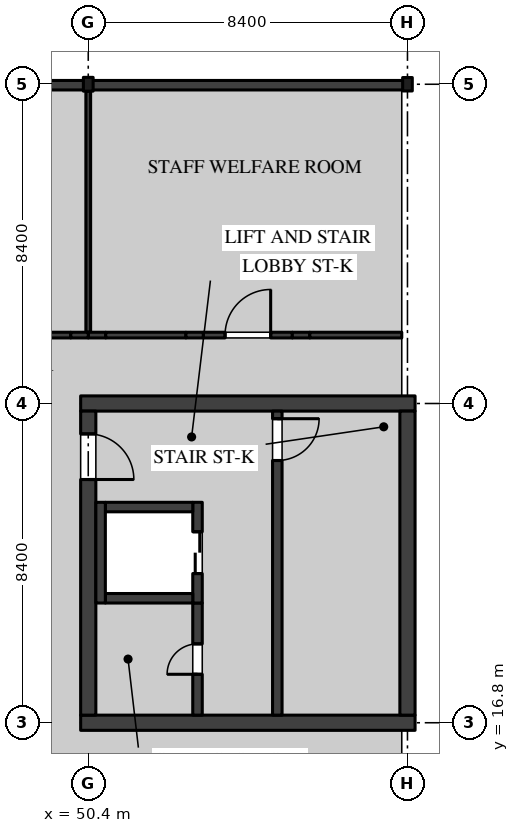
"""IFC4 building model, lengths in metres.
Left out: names, types, materials, properties, quantities, classifications, styles, units other than length and angle.
Written with IfcOpenShell. Run it as: python <this file> out.ifc"""

import sys

from ifc_helpers import new_model, si_unit, direction, frame, frame_2d, origin, origin_2d, place, context, subcontext, project, spatial, rectangle, i_section, extrude, element, fill, save


model = new_model("IFC4")
c1 = context("Model", 3, precision=1e-05, world=origin(), true_north=direction((0.0, 1.0)))
c2 = subcontext(c1, "Body", "Model", "MODEL_VIEW")
j1 = project(units=[si_unit("LENGTHUNIT", "METRE"), si_unit("PLANEANGLEUNIT", "RADIAN")], contexts=[c1])
p1 = place(None, origin())
s1 = spatial("IfcSite", under=j1, at=p1, CompositionType="ELEMENT")
p2 = place(p1, origin())
s2 = spatial("IfcBuilding", under=s1, at=p2, CompositionType="ELEMENT")
p3 = place(p2, frame((0.0, 0.0, 14.4)))
s3 = spatial("IfcBuildingStorey", under=s2, at=p3, CompositionType="ELEMENT", Elevation=14.4)
p4 = place(p3, frame((50.4, 33.6, 0.0), z_axis=(0.0, 0.0, 1.0), x_axis=(1.0, 0.0, 0.0)))
e1 = element("IfcColumn", 1, at=p4, inside=s3, PredefinedType="COLUMN", context=c2, shape_type="SweptSolid", body=[
    extrude(i_section(OverallWidth=0.257, OverallDepth=0.363, WebThickness=0.013, FlangeThickness=0.022, FilletRadius=0.015, at=origin_2d()), origin(), (0.0, 0.0, 1.0), 4.37),
])
p5 = place(p3, frame((58.8, 33.6, 0.0), z_axis=(0.0, 0.0, 1.0), x_axis=(1.0, 0.0, 0.0)))
e2 = element("IfcColumn", 2, at=p5, inside=s3, PredefinedType="COLUMN", context=c2, shape_type="SweptSolid", body=[
    extrude(i_section(OverallWidth=0.254, OverallDepth=0.353, WebThickness=0.01, FlangeThickness=0.016, FilletRadius=0.015, at=origin_2d()), origin(), (0.0, 0.0, 1.0), 4.37),
])
for number, where, z_axis, x_axis in (
    (3, (50.2, 16.8, 0.0), (0.0, 0.0, 1.0), (1.0, 0.0, 0.0)),
    (4, (50.2, 25.2, 0.0), (0.0, 0.0, 1.0), (1.0, 0.0, 0.0)),
):
    element("IfcWall", number, at=place(p3, frame(where, z_axis=z_axis, x_axis=x_axis)), inside=s3, PredefinedType="SHEAR", context=c2, shape_type="SweptSolid", body=[
        extrude(rectangle(XDim=8.8, YDim=0.4, at=frame_2d((4.4, 0.0))), origin(), (0.0, 0.0, 1.0), 4.37),
    ])
p6 = place(p3, frame((50.4, 17.0, 0.0), z_axis=(0.0, 0.0, 1.0), x_axis=(0.0, 1.0, 0.0)))
e5 = element("IfcWall", 5, at=p6, inside=s3, PredefinedType="SHEAR", context=c2, shape_type="SweptSolid", body=[
    extrude(rectangle(XDim=8.0, YDim=0.4, at=frame_2d((4.0, 0.0))), origin(), (0.0, 0.0, 1.0), 4.37),
])
p7 = place(p6, frame((6.2, 0.0, 0.0)))
e6 = element("IfcOpeningElement", 6, at=p7, cuts=e5, PredefinedType="OPENING", context=c2, shape_type="SweptSolid", body=[
    extrude(rectangle(XDim=1.2, YDim=2.1, at=frame_2d((0.6, 1.05))), frame((0.0, 0.21, 0.0), z_axis=(0.0, -1.0, 0.0), x_axis=(1.0, 0.0, 0.0)), (0.0, 0.0, 1.0), 0.42),
])
p8 = place(p3, frame((58.8, 17.0, 0.0), z_axis=(0.0, 0.0, 1.0), x_axis=(0.0, 1.0, 0.0)))
e7 = element("IfcWall", 7, at=p8, inside=s3, PredefinedType="SHEAR", context=c2, shape_type="SweptSolid", body=[
    extrude(rectangle(XDim=8.0, YDim=0.4, at=frame_2d((4.0, 0.0))), origin(), (0.0, 0.0, 1.0), 4.37),
])
p9 = place(p3, frame((55.375, 25.0, 0.0), z_axis=(0.0, 0.0, 1.0), x_axis=(0.0, -1.0, 0.0)))
e8 = element("IfcWall", 8, at=p9, inside=s3, PredefinedType="SOLIDWALL", context=c2, shape_type="SweptSolid", body=[
    extrude(rectangle(XDim=8.0, YDim=0.25, at=frame_2d((4.0, 0.0))), origin(), (0.0, 0.0, 1.0), 4.37),
])
p10 = place(p9, frame((0.2, 0.0, 0.0)))
e9 = element("IfcOpeningElement", 9, at=p10, cuts=e8, PredefinedType="OPENING", context=c2, shape_type="SweptSolid", body=[
    extrude(rectangle(XDim=1.1, YDim=2.1, at=frame_2d((0.55, 1.05))), frame((0.0, 0.135, 0.0), z_axis=(0.0, -1.0, 0.0), x_axis=(1.0, 0.0, 0.0)), (0.0, 0.0, 1.0), 0.27),
])
p11 = place(p3, frame((53.275, 19.95, 0.0), z_axis=(0.0, 0.0, 1.0), x_axis=(0.0, -1.0, 0.0)))
e10 = element("IfcWall", 10, at=p11, inside=s3, PredefinedType="SOLIDWALL", context=c2, shape_type="SweptSolid", body=[
    extrude(rectangle(XDim=2.95, YDim=0.25, at=frame_2d((1.475, 0.0))), origin(), (0.0, 0.0, 1.0), 4.37),
])
p12 = place(p11, frame((1.075, 0.0, 0.0)))
e11 = element("IfcOpeningElement", 11, at=p12, cuts=e10, PredefinedType="OPENING", context=c2, shape_type="SweptSolid", body=[
    extrude(rectangle(XDim=0.8, YDim=2.1, at=frame_2d((0.4, 1.05))), frame((0.0, 0.135, 0.0), z_axis=(0.0, -1.0, 0.0), x_axis=(1.0, 0.0, 0.0)), (0.0, 0.0, 1.0), 0.27),
])
p13 = place(p3, frame((53.275, 19.95, 0.0), z_axis=(0.0, 0.0, 1.0), x_axis=(0.0, 1.0, 0.0)))
e12 = element("IfcWall", 12, at=p13, inside=s3, PredefinedType="SOLIDWALL", context=c2, shape_type="SweptSolid", body=[
    extrude(rectangle(XDim=2.65, YDim=0.25, at=frame_2d((1.325, 0.0))), origin(), (0.0, 0.0, 1.0), 4.37),
])
p14 = place(p13, frame((0.775, 0.0, 0.0)))
e13 = element("IfcOpeningElement", 13, at=p14, cuts=e12, PredefinedType="OPENING", context=c2, shape_type="SweptSolid", body=[
    extrude(rectangle(XDim=1.1, YDim=2.1, at=frame_2d((0.55, 1.05))), frame((0.0, 0.135, 0.0), z_axis=(0.0, -1.0, 0.0), x_axis=(1.0, 0.0, 0.0)), (0.0, 0.0, 1.0), 0.27),
])
for number, where, z_axis, x_axis in (
    (14, (50.85, 22.475, 0.0), (0.0, 0.0, 1.0), (1.0, 0.0, 0.0)),
    (15, (50.85, 20.075, 0.0), (0.0, 0.0, 1.0), (1.0, 0.0, 0.0)),
):
    element("IfcWall", number, at=place(p3, frame(where, z_axis=z_axis, x_axis=x_axis)), inside=s3, PredefinedType="SOLIDWALL", context=c2, shape_type="SweptSolid", body=[
        extrude(rectangle(XDim=2.3, YDim=0.25, at=frame_2d((1.15, 0.0))), origin(), (0.0, 0.0, 1.0), 4.37),
    ])
p15 = place(p3, frame((50.725, 19.95, 0.0), z_axis=(0.0, 0.0, 1.0), x_axis=(0.0, 1.0, 0.0)))
e16 = element("IfcWall", 16, at=p15, inside=s3, PredefinedType="SOLIDWALL", context=c2, shape_type="SweptSolid", body=[
    extrude(rectangle(XDim=2.65, YDim=0.25, at=frame_2d((1.325, 0.0))), origin(), (0.0, 0.0, 1.0), 4.37),
])
p16 = place(p3, frame((50.4, 27.075, 0.0), z_axis=(0.0, 0.0, 1.0), x_axis=(0.0, 1.0, 0.0)))
e17 = element("IfcWall", 17, at=p16, inside=s3, PredefinedType="PARTITIONING", context=c2, shape_type="SweptSolid", body=[
    extrude(rectangle(XDim=6.344, YDim=0.125, at=frame_2d((3.172, 0.0))), origin(), (0.0, 0.0, 1.0), 3.743),
])
p17 = place(p3, frame((50.4, 27.0, 0.0), z_axis=(0.0, 0.0, 1.0), x_axis=(1.0, 0.0, 0.0)))
e18 = element("IfcWall", 18, at=p17, inside=s3, PredefinedType="PARTITIONING", context=c2, shape_type="SweptSolid", body=[
    extrude(rectangle(XDim=0.46, YDim=0.15, at=frame_2d((0.23, 0.0))), origin(), (0.0, 0.0, 1.0), 3.743),
])
p18 = place(p3, frame((50.86, 27.0, 0.0), z_axis=(0.0, 0.0, 1.0), x_axis=(1.0, 0.0, 0.0)))
e19 = element("IfcWall", 19, at=p18, inside=s3, PredefinedType="PARTITIONING", context=c2, shape_type="SweptSolid", body=[
    extrude(rectangle(XDim=2.11, YDim=0.15, at=frame_2d((1.055, 0.0))), origin(), (0.0, 0.0, 1.0), 4.37),
])
p19 = place(p3, frame((52.97, 27.0, 0.0), z_axis=(0.0, 0.0, 1.0), x_axis=(1.0, 0.0, 0.0)))
e20 = element("IfcWall", 20, at=p19, inside=s3, PredefinedType="PARTITIONING", context=c2, shape_type="SweptSolid", body=[
    extrude(rectangle(XDim=0.46, YDim=0.15, at=frame_2d((0.23, 0.0))), origin(), (0.0, 0.0, 1.0), 3.941),
])
p20 = place(p3, frame((53.43, 27.0, 0.0), z_axis=(0.0, 0.0, 1.0), x_axis=(1.0, 0.0, 0.0)))
e21 = element("IfcWall", 21, at=p20, inside=s3, PredefinedType="PARTITIONING", context=c2, shape_type="SweptSolid", body=[
    extrude(rectangle(XDim=2.34, YDim=0.15, at=frame_2d((1.17, 0.0))), origin(), (0.0, 0.0, 1.0), 4.37),
])
p21 = place(p20, frame((0.57, 0.0, 0.0)))
e22 = element("IfcOpeningElement", 22, at=p21, cuts=e21, PredefinedType="OPENING", context=c2, shape_type="SweptSolid", body=[
    extrude(rectangle(XDim=1.2, YDim=2.4, at=frame_2d((0.6, 1.2))), frame((0.0, 0.085, 0.0), z_axis=(0.0, -1.0, 0.0), x_axis=(1.0, 0.0, 0.0)), (0.0, 0.0, 1.0), 0.17),
])
p22 = place(p3, frame((55.77, 27.0, 0.0), z_axis=(0.0, 0.0, 1.0), x_axis=(1.0, 0.0, 0.0)))
e23 = element("IfcWall", 23, at=p22, inside=s3, PredefinedType="PARTITIONING", context=c2, shape_type="SweptSolid", body=[
    extrude(rectangle(XDim=0.46, YDim=0.15, at=frame_2d((0.23, 0.0))), origin(), (0.0, 0.0, 1.0), 3.941),
])
p23 = place(p3, frame((56.23, 27.0, 0.0), z_axis=(0.0, 0.0, 1.0), x_axis=(1.0, 0.0, 0.0)))
e24 = element("IfcWall", 24, at=p23, inside=s3, PredefinedType="PARTITIONING", context=c2, shape_type="SweptSolid", body=[
    extrude(rectangle(XDim=2.42, YDim=0.15, at=frame_2d((1.21, 0.0))), origin(), (0.0, 0.0, 1.0), 4.37),
])
p24 = place(p3, frame((47.83, 27.0, 0.0), z_axis=(0.0, 0.0, 1.0), x_axis=(1.0, 0.0, 0.0)))
e25 = element("IfcWall", 25, at=p24, inside=s3, PredefinedType="PARTITIONING", context=c2, shape_type="SweptSolid", body=[
    extrude(rectangle(XDim=2.11, YDim=0.15, at=frame_2d((1.055, 0.0))), origin(), (0.0, 0.0, 1.0), 4.37),
])
p25 = place(p3, frame((49.94, 27.0, 0.0), z_axis=(0.0, 0.0, 1.0), x_axis=(1.0, 0.0, 0.0)))
e26 = element("IfcWall", 26, at=p25, inside=s3, PredefinedType="PARTITIONING", context=c2, shape_type="SweptSolid", body=[
    extrude(rectangle(XDim=0.46, YDim=0.15, at=frame_2d((0.23, 0.0))), origin(), (0.0, 0.0, 1.0), 3.743),
])
p26 = place(p3, frame((58.795, 33.575, 0.0), z_axis=(0.0, 0.0, 1.0), x_axis=(-1.0, 0.0, 0.0)))
e27 = element("IfcWall", 27, at=p26, inside=s3, PredefinedType="SOLIDWALL", context=c2, shape_type="SweptSolid", body=[
    extrude(rectangle(XDim=8.391, YDim=0.25, at=frame_2d((4.195, 0.0))), origin(), (0.0, 0.0, 1.0), 3.819),
])
p27 = place(p3, frame((50.396, 33.575, 0.0), z_axis=(0.0, 0.0, 1.0), x_axis=(-1.0, 0.0, 0.0)))
e28 = element("IfcWall", 28, at=p27, inside=s3, PredefinedType="SOLIDWALL", context=c2, shape_type="SweptSolid", body=[
    extrude(rectangle(XDim=8.393, YDim=0.25, at=frame_2d((4.196, 0.0))), origin(), (0.0, 0.0, 1.0), 3.743),
])
p28 = place(p7, frame((1.2, 0.0, 0.0), z_axis=(0.0, 0.0, 1.0), x_axis=(-1.0, 0.0, 0.0)))
e29 = element("IfcDoor", 29, at=p28, inside=s3, OperationType="SINGLE_SWING_LEFT", PredefinedType="DOOR", context=c2, shape_type="SweptSolid", body=[
    extrude(rectangle(XDim=1.2, YDim=2.1, at=frame_2d((0.6, 1.05))), frame((0.0, 0.035, 0.0), z_axis=(0.0, -1.0, 0.0), x_axis=(1.0, 0.0, 0.0)), (0.0, 0.0, 1.0), 0.07),
])
fill(e6, e29)
p29 = place(p12, frame((0.8, 0.0, 0.0), z_axis=(0.0, 0.0, 1.0), x_axis=(-1.0, 0.0, 0.0)))
e30 = element("IfcDoor", 30, at=p29, inside=s3, OperationType="SINGLE_SWING_RIGHT", PredefinedType="DOOR", context=c2, shape_type="SweptSolid", body=[
    extrude(rectangle(XDim=0.8, YDim=2.1, at=frame_2d((0.4, 1.05))), frame((0.0, 0.035, 0.0), z_axis=(0.0, -1.0, 0.0), x_axis=(1.0, 0.0, 0.0)), (0.0, 0.0, 1.0), 0.07),
])
fill(e11, e30)
p30 = place(p10, origin())
e31 = element("IfcDoor", 31, at=p30, inside=s3, OperationType="SINGLE_SWING_RIGHT", PredefinedType="DOOR", context=c2, shape_type="SweptSolid", body=[
    extrude(rectangle(XDim=1.1, YDim=2.1, at=frame_2d((0.55, 1.05))), frame((0.0, 0.035, 0.0), z_axis=(0.0, -1.0, 0.0), x_axis=(1.0, 0.0, 0.0)), (0.0, 0.0, 1.0), 0.07),
])
fill(e9, e31)
p31 = place(p14, origin())
e32 = element("IfcDoor", 32, at=p31, inside=s3, OperationType="DOUBLE_DOOR_SLIDING", PredefinedType="DOOR", context=c2, shape_type="SweptSolid", body=[
    extrude(rectangle(XDim=1.1, YDim=2.1, at=frame_2d((0.55, 1.05))), frame((0.0, 0.04, 0.0), z_axis=(0.0, -1.0, 0.0), x_axis=(1.0, 0.0, 0.0)), (0.0, 0.0, 1.0), 0.08),
])
fill(e13, e32)
p32 = place(p21, origin())
e33 = element("IfcDoor", 33, at=p32, inside=s3, OperationType="SINGLE_SWING_LEFT", PredefinedType="DOOR", context=c2, shape_type="SweptSolid", body=[
    extrude(rectangle(XDim=1.2, YDim=2.4, at=frame_2d((0.6, 1.2))), frame((0.0, 0.025, 0.0), z_axis=(0.0, -1.0, 0.0), x_axis=(1.0, 0.0, 0.0)), (0.0, 0.0, 1.0), 0.05),
])
fill(e22, e33)
save(model, sys.argv[1])
